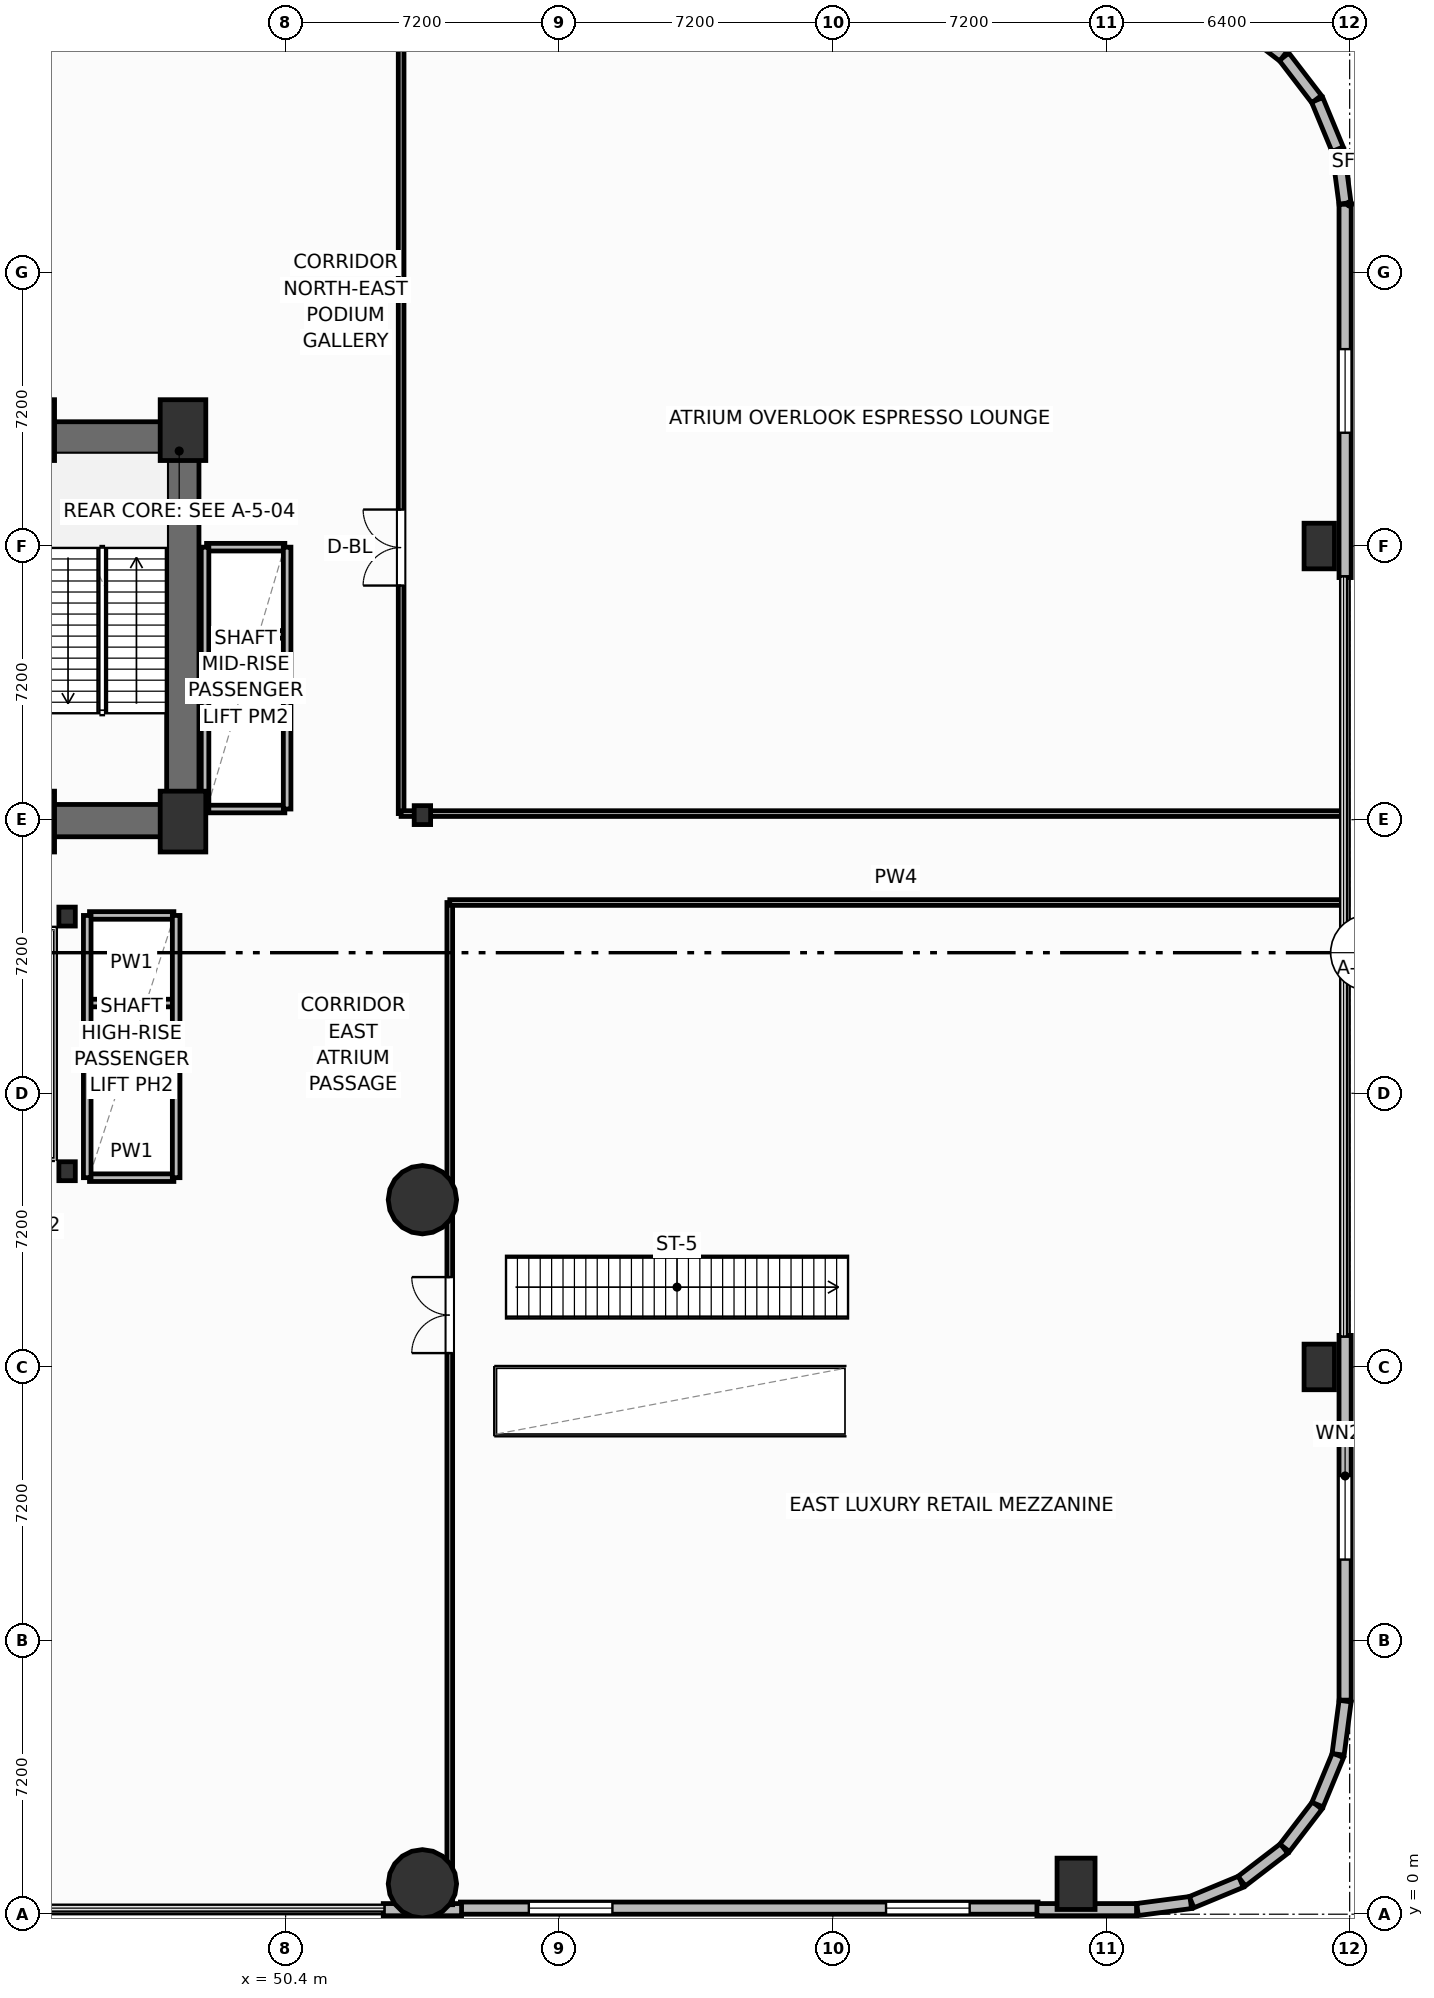
"""IFC4 building model, lengths in metres.
Left out: names, types, materials, properties, quantities, classifications, styles, units other than length and angle.
Written with IfcOpenShell. Run it as: python <this file> out.ifc"""

import sys

from ifc_helpers import new_model, si_unit, direction, frame, frame_2d, origin, origin_2d, place, context, subcontext, project, spatial, rectangle, circle, i_section, extrude, element, fill, save


model = new_model("IFC4")
c1 = context("Model", 3, precision=1e-05, world=origin(), true_north=direction((0.0, 1.0)))
c2 = subcontext(c1, "Body", "Model", "MODEL_VIEW")
j1 = project(units=[si_unit("LENGTHUNIT", "METRE"), si_unit("PLANEANGLEUNIT", "RADIAN")], contexts=[c1])
p1 = place(None, origin())
s1 = spatial("IfcSite", under=j1, at=p1, CompositionType="ELEMENT")
p2 = place(p1, origin())
s2 = spatial("IfcBuilding", under=s1, at=p2, CompositionType="ELEMENT")
p3 = place(p2, frame((0.0, 0.0, 5.4)))
s3 = spatial("IfcBuildingStorey", under=s2, at=p3, CompositionType="ELEMENT", Elevation=5.4)
for number, where, z_axis, x_axis in (
    (1, (43.72, 28.75, 0.0), (0.0, 0.0, 1.0), (1.0, 0.0, 0.0)),
    (2, (47.7, 28.75, 0.0), (0.0, 0.0, 1.0), (1.0, 0.0, 0.0)),
    (3, (43.72, 39.05, 0.0), (0.0, 0.0, 1.0), (1.0, 0.0, 0.0)),
    (4, (47.7, 39.05, 0.0), (0.0, 0.0, 1.0), (1.0, 0.0, 0.0)),
):
    element("IfcColumn", number, at=place(p3, frame(where, z_axis=z_axis, x_axis=x_axis)), inside=s3, PredefinedType="COLUMN", context=c2, shape_type="SweptSolid", body=[
        extrude(rectangle(XDim=1.2, YDim=1.6, at=origin_2d()), origin(), (0.0, 0.0, 1.0), 5.4),
    ])
for number, where, z_axis, x_axis in (
    (5, (44.65, 19.55, 0.0), (0.0, 0.0, 1.0), (1.0, 0.0, 0.0)),
    (6, (44.65, 26.25, 0.0), (0.0, 0.0, 1.0), (1.0, 0.0, 0.0)),
    (7, (54.0, 28.92, 0.0), (0.0, 0.0, 1.0), (1.0, 0.0, 0.0)),
):
    element("IfcColumn", number, at=place(p3, frame(where, z_axis=z_axis, x_axis=x_axis)), inside=s3, PredefinedType="COLUMN", context=c2, shape_type="SweptSolid", body=[
        extrude(i_section(OverallWidth=0.432, OverallDepth=0.498, WebThickness=0.056, FlangeThickness=0.089, FilletRadius=0.025, at=origin_2d()), origin(), (0.0, 0.0, 1.0), 5.4),
    ])
p4 = place(p3, frame((30.28, 38.845, 0.0), z_axis=(0.0, 0.0, 1.0), x_axis=(1.0, 0.0, 0.0)))
e8 = element("IfcWall", 8, at=p4, inside=s3, PredefinedType="SHEAR", context=c2, shape_type="SweptSolid", body=[
    extrude(rectangle(XDim=17.84, YDim=0.85, at=frame_2d((8.92, 0.0))), origin(), (0.0, 0.0, 1.0), 5.12),
])
p5 = place(p3, frame((47.695, 29.2, 0.0), z_axis=(0.0, 0.0, 1.0), x_axis=(0.0, 1.0, 0.0)))
e9 = element("IfcWall", 9, at=p5, inside=s3, PredefinedType="SHEAR", context=c2, shape_type="SweptSolid", body=[
    extrude(rectangle(XDim=9.22, YDim=0.85, at=frame_2d((4.61, 0.0))), origin(), (0.0, 0.0, 1.0), 5.12),
])
p6 = place(p3, frame((43.6, 28.775, 0.0), z_axis=(0.0, 0.0, 1.0), x_axis=(1.0, 0.0, 0.0)))
e10 = element("IfcWall", 10, at=p6, inside=s3, PredefinedType="SHEAR", context=c2, shape_type="SweptSolid", body=[
    extrude(rectangle(XDim=4.52, YDim=0.85, at=frame_2d((2.26, 0.0))), origin(), (0.0, 0.0, 1.0), 5.12),
])
p7 = place(p3, frame((54.0, 0.8, 0.0), z_axis=(0.0, 0.0, 1.0), x_axis=(1.0, 0.0, 0.0)))
e11 = element("IfcColumn", 11, at=p7, inside=s3, PredefinedType="COLUMN", context=c2, shape_type="SweptSolid", body=[
    extrude(circle(Radius=0.9, at=origin_2d()), origin(), (0.0, 0.0, 1.0), 5.4),
])
p8 = place(p3, frame((71.2, 0.8, 0.0), z_axis=(0.0, 0.0, 1.0), x_axis=(1.0, 0.0, 0.0)))
e12 = element("IfcColumn", 12, at=p8, inside=s3, PredefinedType="COLUMN", context=c2, shape_type="SweptSolid", body=[
    extrude(rectangle(XDim=1.0, YDim=1.35, at=origin_2d()), origin(), (0.0, 0.0, 1.0), 5.4),
])
p9 = place(p3, frame((54.0, 18.8, 0.0), z_axis=(0.0, 0.0, 1.0), x_axis=(1.0, 0.0, 0.0)))
e13 = element("IfcColumn", 13, at=p9, inside=s3, PredefinedType="COLUMN", context=c2, shape_type="SweptSolid", body=[
    extrude(circle(Radius=0.9, at=origin_2d()), origin(), (0.0, 0.0, 1.0), 5.4),
])
for number, where, z_axis, x_axis in (
    (14, (77.6, 14.4, 0.0), (0.0, 0.0, 1.0), (1.0, 0.0, 0.0)),
    (15, (77.6, 36.0, 0.0), (0.0, 0.0, 1.0), (1.0, 0.0, 0.0)),
):
    element("IfcColumn", number, at=place(p3, frame(where, z_axis=z_axis, x_axis=x_axis)), inside=s3, PredefinedType="PILASTER", context=c2, shape_type="SweptSolid", body=[
        extrude(rectangle(XDim=0.8, YDim=1.2, at=origin_2d()), origin(), (0.0, 0.0, 1.0), 5.4),
    ])
p10 = place(p3, frame((70.2, 0.16, 0.0), z_axis=(0.0, 0.0, 1.0), x_axis=(-1.0, 0.0, 0.0)))
e16 = element("IfcWall", 16, at=p10, inside=s3, PredefinedType="SOLIDWALL", context=c2, shape_type="SweptSolid", body=[
    extrude(rectangle(XDim=15.2, YDim=0.32, at=frame_2d((7.6, 0.0))), origin(), (0.0, 0.0, 1.0), 4.07),
])
p11 = place(p10, frame((1.8, 0.0, 0.8)))
e17 = element("IfcOpeningElement", 17, at=p11, cuts=e16, PredefinedType="OPENING", context=c2, shape_type="SweptSolid", body=[
    extrude(rectangle(XDim=2.2, YDim=1.85, at=frame_2d((1.1, 0.925))), frame((0.0, 0.17, 0.0), z_axis=(0.0, -1.0, 0.0), x_axis=(1.0, 0.0, 0.0)), (0.0, 0.0, 1.0), 0.34),
])
p12 = place(p10, frame((11.2, 0.0, 0.8)))
e18 = element("IfcOpeningElement", 18, at=p12, cuts=e16, PredefinedType="OPENING", context=c2, shape_type="SweptSolid", body=[
    extrude(rectangle(XDim=2.2, YDim=1.85, at=frame_2d((1.1, 0.925))), frame((0.0, 0.17, 0.0), z_axis=(0.0, -1.0, 0.0), x_axis=(1.0, 0.0, 0.0)), (0.0, 0.0, 1.0), 0.34),
])
p13 = place(p3, frame((52.97, 0.12, 0.0), z_axis=(0.0, 0.0, 1.0), x_axis=(1.0, 0.0, 0.0)))
e19 = element("IfcWall", 19, at=p13, inside=s3, PredefinedType="SOLIDWALL", context=c2, shape_type="SweptSolid", body=[
    extrude(rectangle(XDim=2.06, YDim=0.32, at=frame_2d((1.03, 0.0))), origin(), (0.0, 0.0, 1.0), 4.07),
])
p14 = place(p3, frame((70.17, 0.12, 0.0), z_axis=(0.0, 0.0, 1.0), x_axis=(1.0, 0.0, 0.0)))
e20 = element("IfcWall", 20, at=p14, inside=s3, PredefinedType="SOLIDWALL", context=c2, shape_type="SweptSolid", body=[
    extrude(rectangle(XDim=2.622, YDim=0.32, at=frame_2d((1.311, 0.0))), origin(), (0.0, 0.0, 1.0), 4.07),
])
p15 = place(p3, frame((72.817, 0.123, 0.0), z_axis=(0.0, 0.0, 1.0), x_axis=(0.991457235349, 0.130432168094, 0.0)))
e21 = element("IfcWall", 21, at=p15, inside=s3, PredefinedType="SOLIDWALL", context=c2, shape_type="SweptSolid", body=[
    extrude(rectangle(XDim=1.413, YDim=0.32, at=frame_2d((0.707, 0.0))), origin(), (0.0, 0.0, 1.0), 4.07),
])
for number, where, z_axis, x_axis in (
    (22, (74.241, 0.317, 0.0), (0.0, 0.0, 1.0), (0.924, 0.383, 0.0)),
    (23, (75.559, 0.87, 0.0), (0.0, 0.0, 1.0), (0.793, 0.609, 0.0)),
    (24, (76.689, 1.746, 0.0), (0.0, 0.0, 1.0), (0.609, 0.793, 0.0)),
    (25, (77.554, 2.884, 0.0), (0.0, 0.0, 1.0), (0.383, 0.924, 0.0)),
):
    element("IfcWall", number, at=place(p3, frame(where, z_axis=z_axis, x_axis=x_axis)), inside=s3, PredefinedType="SOLIDWALL", context=c2, shape_type="SweptSolid", body=[
        extrude(rectangle(XDim=1.405, YDim=0.32, at=frame_2d((0.703, 0.0))), origin(), (0.0, 0.0, 1.0), 4.07),
    ])
p16 = place(p3, frame((78.096, 4.207, 0.0), z_axis=(0.0, 0.0, 1.0), x_axis=(0.130432168094, 0.991457235349, 0.0)))
e26 = element("IfcWall", 26, at=p16, inside=s3, PredefinedType="SOLIDWALL", context=c2, shape_type="SweptSolid", body=[
    extrude(rectangle(XDim=1.413, YDim=0.32, at=frame_2d((0.707, 0.0))), origin(), (0.0, 0.0, 1.0), 4.07),
])
p17 = place(p3, frame((78.28, 5.633, 0.0), z_axis=(0.0, 0.0, 1.0), x_axis=(0.0, 1.0, 0.0)))
e27 = element("IfcWall", 27, at=p17, inside=s3, PredefinedType="SOLIDWALL", context=c2, shape_type="SweptSolid", body=[
    extrude(rectangle(XDim=9.597, YDim=0.32, at=frame_2d((4.799, 0.0))), origin(), (0.0, 0.0, 1.0), 4.07),
])
p18 = place(p17, frame((3.698, 0.0, 0.8)))
e28 = element("IfcOpeningElement", 28, at=p18, cuts=e27, PredefinedType="OPENING", context=c2, shape_type="SweptSolid", body=[
    extrude(rectangle(XDim=2.2, YDim=2.0, at=frame_2d((1.1, 1.0))), frame((0.0, 0.17, 0.0), z_axis=(0.0, -1.0, 0.0), x_axis=(1.0, 0.0, 0.0)), (0.0, 0.0, 1.0), 0.34),
])
p19 = place(p3, frame((78.28, 35.17, 0.0), z_axis=(0.0, 0.0, 1.0), x_axis=(0.0, 1.0, 0.0)))
e29 = element("IfcWall", 29, at=p19, inside=s3, PredefinedType="SOLIDWALL", context=c2, shape_type="SweptSolid", body=[
    extrude(rectangle(XDim=9.822, YDim=0.32, at=frame_2d((4.911, 0.0))), origin(), (0.0, 0.0, 1.0), 4.07),
])
p20 = place(p19, frame((3.811, 0.0, 0.8)))
e30 = element("IfcOpeningElement", 30, at=p20, cuts=e29, PredefinedType="OPENING", context=c2, shape_type="SweptSolid", body=[
    extrude(rectangle(XDim=2.2, YDim=2.0, at=frame_2d((1.1, 1.0))), frame((0.0, 0.17, 0.0), z_axis=(0.0, -1.0, 0.0), x_axis=(1.0, 0.0, 0.0)), (0.0, 0.0, 1.0), 0.34),
])
p21 = place(p3, frame((78.277, 45.017, 0.0), z_axis=(0.0, 0.0, 1.0), x_axis=(-0.130409831203, 0.991460173646, 0.0)))
e31 = element("IfcWall", 31, at=p21, inside=s3, PredefinedType="SOLIDWALL", context=c2, shape_type="SweptSolid", body=[
    extrude(rectangle(XDim=1.413, YDim=0.32, at=frame_2d((0.707, 0.0))), origin(), (0.0, 0.0, 1.0), 4.07),
])
for number, where, z_axis, x_axis in (
    (32, (78.083, 46.441, 0.0), (0.0, 0.0, 1.0), (-0.383, 0.924, 0.0)),
    (33, (77.53, 47.759, 0.0), (0.0, 0.0, 1.0), (-0.609, 0.793, 0.0)),
    (34, (76.654, 48.889, 0.0), (0.0, 0.0, 1.0), (-0.793, 0.609, 0.0)),
):
    element("IfcWall", number, at=place(p3, frame(where, z_axis=z_axis, x_axis=x_axis)), inside=s3, PredefinedType="SOLIDWALL", context=c2, shape_type="SweptSolid", body=[
        extrude(rectangle(XDim=1.405, YDim=0.32, at=frame_2d((0.703, 0.0))), origin(), (0.0, 0.0, 1.0), 4.07),
    ])
p22 = place(p3, frame((54.72, 0.25, 0.0), z_axis=(0.0, 0.0, 1.0), x_axis=(0.0, 1.0, 0.0)))
e35 = element("IfcWall", 35, at=p22, inside=s3, PredefinedType="PARTITIONING", context=c2, shape_type="SweptSolid", body=[
    extrude(rectangle(XDim=26.37, YDim=0.15, at=frame_2d((13.185, 0.0))), origin(), (0.0, 0.0, 1.0), 5.12),
])
p23 = place(p22, frame((14.514, 0.0, 0.0)))
e36 = element("IfcOpeningElement", 36, at=p23, cuts=e35, PredefinedType="OPENING", context=c2, shape_type="SweptSolid", body=[
    extrude(rectangle(XDim=2.0, YDim=2.05, at=frame_2d((1.0, 1.025))), frame((0.0, 0.085, 0.0), z_axis=(0.0, -1.0, 0.0), x_axis=(1.0, 0.0, 0.0)), (0.0, 0.0, 1.0), 0.17),
])
p24 = place(p3, frame((54.72, 26.62, 0.0), z_axis=(0.0, 0.0, 1.0), x_axis=(1.0, 0.0, 0.0)))
e37 = element("IfcWall", 37, at=p24, inside=s3, PredefinedType="PARTITIONING", context=c2, shape_type="SweptSolid", body=[
    extrude(rectangle(XDim=23.48, YDim=0.15, at=frame_2d((11.74, 0.0))), origin(), (0.0, 0.0, 1.0), 5.12),
])
p25 = place(p3, frame((53.44, 28.96, 0.0), z_axis=(0.0, 0.0, 1.0), x_axis=(0.0, 1.0, 0.0)))
e38 = element("IfcWall", 38, at=p25, inside=s3, PredefinedType="PARTITIONING", context=c2, shape_type="SweptSolid", body=[
    extrude(rectangle(XDim=21.34, YDim=0.15, at=frame_2d((10.67, 0.0))), origin(), (0.0, 0.0, 1.0), 5.12),
])
p26 = place(p25, frame((6.0, 0.0, 0.0)))
e39 = element("IfcOpeningElement", 39, at=p26, cuts=e38, PredefinedType="OPENING", context=c2, shape_type="SweptSolid", body=[
    extrude(rectangle(XDim=2.0, YDim=2.05, at=frame_2d((1.0, 1.025))), frame((0.0, 0.085, 0.0), z_axis=(0.0, -1.0, 0.0), x_axis=(1.0, 0.0, 0.0)), (0.0, 0.0, 1.0), 0.17),
])
p27 = place(p3, frame((53.44, 28.96, 0.0), z_axis=(0.0, 0.0, 1.0), x_axis=(1.0, 0.0, 0.0)))
e40 = element("IfcWall", 40, at=p27, inside=s3, PredefinedType="PARTITIONING", context=c2, shape_type="SweptSolid", body=[
    extrude(rectangle(XDim=24.76, YDim=0.15, at=frame_2d((12.38, 0.0))), origin(), (0.0, 0.0, 1.0), 4.332),
])
for number, where, z_axis, x_axis in (
    (41, (48.32, 31.375, 0.0), (0.0, 0.0, 1.0), (1.0, 0.0, 0.0)),
    (42, (48.32, 33.675, 0.0), (0.0, 0.0, 1.0), (1.0, 0.0, 0.0)),
):
    element("IfcWall", number, at=place(p3, frame(where, z_axis=z_axis, x_axis=x_axis)), inside=s3, PredefinedType="PARTITIONING", context=c2, shape_type="SweptSolid", body=[
        extrude(rectangle(XDim=2.06, YDim=0.2, at=frame_2d((1.03, 0.0))), origin(), (0.0, 0.0, 1.0), 5.12),
    ])
p28 = place(p3, frame((48.32, 29.08, 0.0), z_axis=(0.0, 0.0, 1.0), x_axis=(1.0, 0.0, 0.0)))
e43 = element("IfcWall", 43, at=p28, inside=s3, PredefinedType="PARTITIONING", context=c2, shape_type="SweptSolid", body=[
    extrude(rectangle(XDim=2.06, YDim=0.2, at=frame_2d((1.03, 0.0))), origin(), (0.0, 0.0, 1.0), 4.332),
])
p29 = place(p3, frame((48.32, 35.97, 0.0), z_axis=(0.0, 0.0, 1.0), x_axis=(1.0, 0.0, 0.0)))
e44 = element("IfcWall", 44, at=p29, inside=s3, PredefinedType="PARTITIONING", context=c2, shape_type="SweptSolid", body=[
    extrude(rectangle(XDim=2.06, YDim=0.2, at=frame_2d((1.03, 0.0))), origin(), (0.0, 0.0, 1.0), 5.12),
])
for number, where, z_axis, x_axis in (
    (45, (48.28, 29.08, 0.0), (0.0, 0.0, 1.0), (0.0, 1.0, 0.0)),
    (46, (50.44, 29.08, 0.0), (0.0, 0.0, 1.0), (0.0, 1.0, 0.0)),
):
    element("IfcWall", number, at=place(p3, frame(where, z_axis=z_axis, x_axis=x_axis)), inside=s3, PredefinedType="PARTITIONING", context=c2, shape_type="SweptSolid", body=[
        extrude(rectangle(XDim=6.89, YDim=0.2, at=frame_2d((3.445, 0.0))), origin(), (0.0, 0.0, 1.0), 5.12),
    ])
for number, where, z_axis, x_axis in (
    (47, (45.24, 21.675, 0.0), (0.0, 0.0, 1.0), (1.0, 0.0, 0.0)),
    (48, (45.24, 23.975, 0.0), (0.0, 0.0, 1.0), (1.0, 0.0, 0.0)),
):
    element("IfcWall", number, at=place(p3, frame(where, z_axis=z_axis, x_axis=x_axis)), inside=s3, PredefinedType="PARTITIONING", context=c2, shape_type="SweptSolid", body=[
        extrude(rectangle(XDim=2.22, YDim=0.2, at=frame_2d((1.11, 0.0))), origin(), (0.0, 0.0, 1.0), 5.12),
    ])
p30 = place(p3, frame((45.24, 19.38, 0.0), z_axis=(0.0, 0.0, 1.0), x_axis=(1.0, 0.0, 0.0)))
e49 = element("IfcWall", 49, at=p30, inside=s3, PredefinedType="PARTITIONING", context=c2, shape_type="SweptSolid", body=[
    extrude(rectangle(XDim=2.22, YDim=0.2, at=frame_2d((1.11, 0.0))), origin(), (0.0, 0.0, 1.0), 4.332),
])
p31 = place(p3, frame((45.24, 26.28, 0.0), z_axis=(0.0, 0.0, 1.0), x_axis=(1.0, 0.0, 0.0)))
e50 = element("IfcWall", 50, at=p31, inside=s3, PredefinedType="PARTITIONING", context=c2, shape_type="SweptSolid", body=[
    extrude(rectangle(XDim=2.22, YDim=0.2, at=frame_2d((1.11, 0.0))), origin(), (0.0, 0.0, 1.0), 5.12),
])
for number, where, z_axis, x_axis in (
    (51, (45.18, 19.38, 0.0), (0.0, 0.0, 1.0), (0.0, 1.0, 0.0)),
    (52, (47.52, 19.38, 0.0), (0.0, 0.0, 1.0), (0.0, 1.0, 0.0)),
):
    element("IfcWall", number, at=place(p3, frame(where, z_axis=z_axis, x_axis=x_axis)), inside=s3, PredefinedType="PARTITIONING", context=c2, shape_type="SweptSolid", body=[
        extrude(rectangle(XDim=6.9, YDim=0.2, at=frame_2d((3.45, 0.0))), origin(), (0.0, 0.0, 1.0), 5.12),
    ])
p32 = place(p11, origin())
e53 = element("IfcWindow", 53, at=p32, inside=s3, PartitioningType="SINGLE_PANEL", PredefinedType="WINDOW", context=c2, shape_type="SweptSolid", body=[
    extrude(rectangle(XDim=2.2, YDim=1.85, at=frame_2d((1.1, 0.925))), frame((0.0, 0.03, 0.0), z_axis=(0.0, -1.0, 0.0), x_axis=(1.0, 0.0, 0.0)), (0.0, 0.0, 1.0), 0.06),
])
fill(e17, e53)
p33 = place(p12, origin())
e54 = element("IfcWindow", 54, at=p33, inside=s3, PartitioningType="SINGLE_PANEL", PredefinedType="WINDOW", context=c2, shape_type="SweptSolid", body=[
    extrude(rectangle(XDim=2.2, YDim=1.85, at=frame_2d((1.1, 0.925))), frame((0.0, 0.03, 0.0), z_axis=(0.0, -1.0, 0.0), x_axis=(1.0, 0.0, 0.0)), (0.0, 0.0, 1.0), 0.06),
])
fill(e18, e54)
p34 = place(p18, origin())
e55 = element("IfcWindow", 55, at=p34, inside=s3, PartitioningType="SINGLE_PANEL", PredefinedType="WINDOW", context=c2, shape_type="SweptSolid", body=[
    extrude(rectangle(XDim=2.2, YDim=2.0, at=frame_2d((1.1, 1.0))), frame((0.0, 0.03, 0.0), z_axis=(0.0, -1.0, 0.0), x_axis=(1.0, 0.0, 0.0)), (0.0, 0.0, 1.0), 0.06),
])
fill(e28, e55)
p35 = place(p20, origin())
e56 = element("IfcWindow", 56, at=p35, inside=s3, PartitioningType="SINGLE_PANEL", PredefinedType="WINDOW", context=c2, shape_type="SweptSolid", body=[
    extrude(rectangle(XDim=2.2, YDim=2.0, at=frame_2d((1.1, 1.0))), frame((0.0, 0.03, 0.0), z_axis=(0.0, -1.0, 0.0), x_axis=(1.0, 0.0, 0.0)), (0.0, 0.0, 1.0), 0.06),
])
fill(e30, e56)
p36 = place(p23, origin())
e57 = element("IfcDoor", 57, at=p36, inside=s3, OperationType="DOUBLE_DOOR_SINGLE_SWING", PredefinedType="DOOR", context=c2, shape_type="SweptSolid", body=[
    extrude(rectangle(XDim=2.0, YDim=2.05, at=frame_2d((1.0, 1.025))), frame((0.0, 0.025, 0.0), z_axis=(0.0, -1.0, 0.0), x_axis=(1.0, 0.0, 0.0)), (0.0, 0.0, 1.0), 0.05),
])
fill(e36, e57)
p37 = place(p26, origin())
e58 = element("IfcDoor", 58, at=p37, inside=s3, OperationType="DOUBLE_DOOR_SINGLE_SWING", PredefinedType="DOOR", context=c2, shape_type="SweptSolid", body=[
    extrude(rectangle(XDim=2.0, YDim=2.05, at=frame_2d((1.0, 1.025))), frame((0.0, 0.025, 0.0), z_axis=(0.0, -1.0, 0.0), x_axis=(1.0, 0.0, 0.0)), (0.0, 0.0, 1.0), 0.05),
])
fill(e39, e58)
save(model, sys.argv[1])
